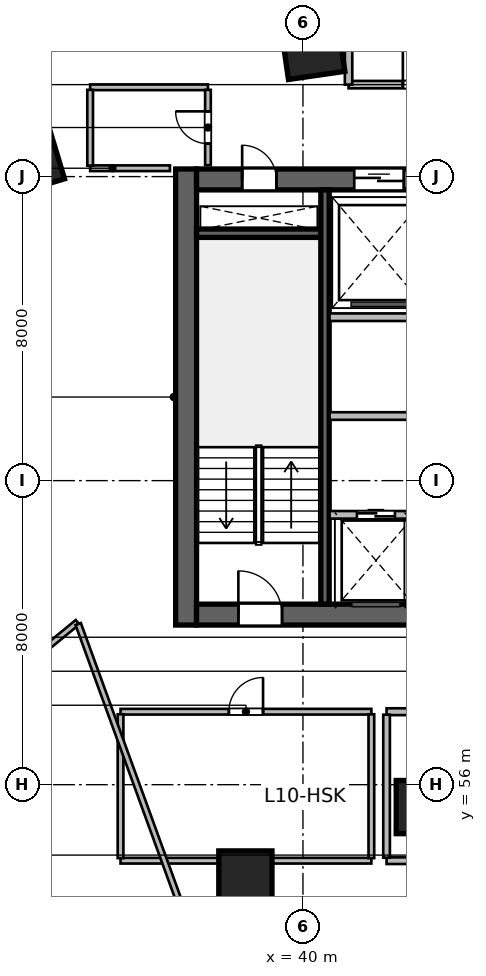
"""IFC4 building model, lengths in metres.
Left out: names, types, materials, properties, quantities, classifications, styles, units other than length and angle.
Written with IfcOpenShell. Run it as: python <this file> out.ifc"""

import sys

from ifc_helpers import new_model, si_unit, direction, frame, frame_2d, origin, origin_2d, place, context, subcontext, project, spatial, rectangle, circle, extrude, source, transform, mapped, element, fill, save


model = new_model("IFC4")
c1 = context("Model", 3, precision=1e-05, world=origin(), true_north=direction((0.0, 1.0)))
c2 = subcontext(c1, "Body", "Model", "MODEL_VIEW")
j1 = project(units=[si_unit("LENGTHUNIT", "METRE"), si_unit("PLANEANGLEUNIT", "RADIAN")], contexts=[c1])
p1 = place(None, origin())
s1 = spatial("IfcSite", under=j1, at=p1, CompositionType="ELEMENT")
p2 = place(p1, origin())
s2 = spatial("IfcBuilding", under=s1, at=p2, CompositionType="ELEMENT")
p3 = place(p2, frame((0.0, 0.0, 49.8)))
s3 = spatial("IfcBuildingStorey", under=s2, at=p3, CompositionType="ELEMENT", Elevation=49.8)
m1 = source(origin(), c2, "Body", "SweptSolid", [
    extrude(rectangle(XDim=12.0, YDim=0.55, at=frame_2d((6.0, 0.0))), origin(), (0.0, 0.0, 1.0), 3.6),
])
p4 = place(p3, frame((36.925, 60.2, 0.0), z_axis=(0.0, 0.0, 1.0), x_axis=(0.0, 1.0, 0.0)))
e1 = element("IfcWall", 1, at=p4, inside=s3, PredefinedType="SHEAR", context=c2, shape_type="MappedRepresentation", body=[
    mapped(m1, transform((0.0, 0.0, 0.0), scale=1.0)),
])
m2 = source(origin(), c2, "Body", "SweptSolid", [
    extrude(rectangle(XDim=21.6, YDim=0.55, at=frame_2d((10.8, 0.0))), origin(), (0.0, 0.0, 1.0), 3.6),
])
p5 = place(p3, frame((37.2, 60.475, 0.0), z_axis=(0.0, 0.0, 1.0), x_axis=(1.0, 0.0, 0.0)))
e2 = element("IfcWall", 2, at=p5, inside=s3, PredefinedType="SHEAR", context=c2, shape_type="MappedRepresentation", body=[
    mapped(m2, transform((0.0, 0.0, 0.0), scale=1.0)),
])
p6 = place(p5, frame((1.1, 0.0, 0.0)))
e3 = element("IfcOpeningElement", 3, at=p6, cuts=e2, PredefinedType="OPENING", context=c2, shape_type="SweptSolid", body=[
    extrude(rectangle(XDim=1.15, YDim=2.15, at=frame_2d((0.575, 1.075))), frame((0.0, 0.285, 0.0), z_axis=(0.0, -1.0, 0.0), x_axis=(1.0, 0.0, 0.0)), (0.0, 0.0, 1.0), 0.57),
])
p7 = place(p5, frame((19.5, 0.0, 0.0)))
e4 = element("IfcOpeningElement", 4, at=p7, cuts=e2, PredefinedType="OPENING", context=c2, shape_type="SweptSolid", body=[
    extrude(rectangle(XDim=0.9, YDim=2.1, at=frame_2d((0.45, 1.05))), frame((0.0, 0.285, 0.0), z_axis=(0.0, -1.0, 0.0), x_axis=(1.0, 0.0, 0.0)), (0.0, 0.0, 1.0), 0.57),
])
p8 = place(p5, frame((12.02, 0.0, 0.0)))
e5 = element("IfcOpeningElement", 5, at=p8, cuts=e2, PredefinedType="OPENING", context=c2, shape_type="SweptSolid", body=[
    extrude(rectangle(XDim=1.6, YDim=2.15, at=frame_2d((0.8, 1.075))), frame((0.0, 0.285, 0.0), z_axis=(0.0, -1.0, 0.0), x_axis=(1.0, 0.0, 0.0)), (0.0, 0.0, 1.0), 0.57),
])
p9 = place(p3, frame((37.2, 71.925, 0.0), z_axis=(0.0, 0.0, 1.0), x_axis=(1.0, 0.0, 0.0)))
e6 = element("IfcWall", 6, at=p9, inside=s3, PredefinedType="SHEAR", context=c2, shape_type="MappedRepresentation", body=[
    mapped(m2, transform((0.0, 0.0, 0.0), scale=1.0)),
])
p10 = place(p9, frame((1.2, 0.0, 0.0)))
e7 = element("IfcOpeningElement", 7, at=p10, cuts=e6, PredefinedType="OPENING", context=c2, shape_type="SweptSolid", body=[
    extrude(rectangle(XDim=0.9, YDim=2.1, at=frame_2d((0.45, 1.05))), frame((0.0, 0.285, 0.0), z_axis=(0.0, -1.0, 0.0), x_axis=(1.0, 0.0, 0.0)), (0.0, 0.0, 1.0), 0.57),
])
p11 = place(p9, frame((14.7, 0.0, 0.0)))
e8 = element("IfcOpeningElement", 8, at=p11, cuts=e6, PredefinedType="OPENING", context=c2, shape_type="SweptSolid", body=[
    extrude(rectangle(XDim=1.2, YDim=2.15, at=frame_2d((0.6, 1.075))), frame((0.0, 0.285, 0.0), z_axis=(0.0, -1.0, 0.0), x_axis=(1.0, 0.0, 0.0)), (0.0, 0.0, 1.0), 0.57),
])
p12 = place(p9, frame((4.15, 0.0, 0.0)))
e9 = element("IfcOpeningElement", 9, at=p12, cuts=e6, PredefinedType="OPENING", context=c2, shape_type="SweptSolid", body=[
    extrude(rectangle(XDim=1.3, YDim=2.15, at=frame_2d((0.65, 1.075))), frame((0.0, 0.285, 0.0), z_axis=(0.0, -1.0, 0.0), x_axis=(1.0, 0.0, 0.0)), (0.0, 0.0, 1.0), 0.57),
])
p13 = place(p9, frame((6.76, 0.0, 0.0)))
e10 = element("IfcOpeningElement", 10, at=p13, cuts=e6, PredefinedType="OPENING", context=c2, shape_type="SweptSolid", body=[
    extrude(rectangle(XDim=0.85, YDim=2.1, at=frame_2d((0.425, 1.05))), frame((0.0, 0.285, 0.0), z_axis=(0.0, -1.0, 0.0), x_axis=(1.0, 0.0, 0.0)), (0.0, 0.0, 1.0), 0.57),
])
p14 = place(p9, frame((8.76, 0.0, 0.0)))
e11 = element("IfcOpeningElement", 11, at=p14, cuts=e6, PredefinedType="OPENING", context=c2, shape_type="SweptSolid", body=[
    extrude(rectangle(XDim=0.85, YDim=2.1, at=frame_2d((0.425, 1.05))), frame((0.0, 0.285, 0.0), z_axis=(0.0, -1.0, 0.0), x_axis=(1.0, 0.0, 0.0)), (0.0, 0.0, 1.0), 0.57),
])
p15 = place(p9, frame((10.725, 0.0, 0.0)))
e12 = element("IfcOpeningElement", 12, at=p15, cuts=e6, PredefinedType="OPENING", context=c2, shape_type="SweptSolid", body=[
    extrude(rectangle(XDim=0.85, YDim=2.1, at=frame_2d((0.425, 1.05))), frame((0.0, 0.285, 0.0), z_axis=(0.0, -1.0, 0.0), x_axis=(1.0, 0.0, 0.0)), (0.0, 0.0, 1.0), 0.57),
])
m3 = source(origin(), c2, "Body", "SweptSolid", [
    extrude(rectangle(XDim=3.27, YDim=0.22, at=frame_2d((1.635, 0.0))), origin(), (0.0, 0.0, 1.0), 3.6),
])
p16 = place(p3, frame((37.2, 70.51, 0.0), z_axis=(0.0, 0.0, 1.0), x_axis=(1.0, 0.0, 0.0)))
e13 = element("IfcWall", 13, at=p16, inside=s3, PredefinedType="SHEAR", context=c2, shape_type="MappedRepresentation", body=[
    mapped(m3, transform((0.0, 0.0, 0.0), scale=1.0)),
])
m4 = source(origin(), c2, "Body", "SweptSolid", [
    extrude(rectangle(XDim=10.9, YDim=0.22, at=frame_2d((5.45, 0.0))), origin(), (0.0, 0.0, 1.0), 3.6),
])
p17 = place(p3, frame((40.58, 60.75, 0.0), z_axis=(0.0, 0.0, 1.0), x_axis=(0.0, 1.0, 0.0)))
e14 = element("IfcWall", 14, at=p17, inside=s3, PredefinedType="SHEAR", context=c2, shape_type="MappedRepresentation", body=[
    mapped(m4, transform((0.0, 0.0, 0.0), scale=1.0)),
])
m5 = source(origin(), c2, "Body", "SweptSolid", [
    extrude(circle(Radius=0.7, at=origin_2d()), origin(), (0.0, 0.0, 1.0), 3.6),
])
p18 = place(p3, frame((38.485, 53.558, 0.0), z_axis=(0.0, 0.0, 1.0), x_axis=(-0.288697611798, 0.957420330337, 0.0)))
e15 = element("IfcColumn", 15, at=p18, inside=s3, PredefinedType="COLUMN", context=c2, shape_type="MappedRepresentation", body=[
    mapped(m5, transform((0.0, 0.0, 0.0), scale=1.0)),
])
m6 = source(origin(), c2, "Body", "SweptSolid", [
    extrude(rectangle(XDim=1.5, YDim=1.5, at=origin_2d()), origin(), (0.0, 0.0, 1.0), 3.6),
])
p19 = place(p3, frame((32.791, 72.442, 0.0), z_axis=(0.0, 0.0, 1.0), x_axis=(-0.288697611798, 0.957420330337, 0.0)))
e16 = element("IfcColumn", 16, at=p19, inside=s3, PredefinedType="COLUMN", context=c2, shape_type="MappedRepresentation", body=[
    mapped(m6, transform((0.0, 0.0, 0.0), scale=1.0)),
])
p20 = place(p3, frame((43.154, 55.411, 0.0), z_axis=(0.0, 0.0, 1.0), x_axis=(-0.143492621991, 0.98965138682, 0.0)))
e17 = element("IfcColumn", 17, at=p20, inside=s3, PredefinedType="COLUMN", context=c2, shape_type="MappedRepresentation", body=[
    mapped(m5, transform((0.0, 0.0, 0.0), scale=1.0)),
])
p21 = place(p3, frame((40.253, 75.404, 0.0), z_axis=(0.0, 0.0, 1.0), x_axis=(-0.143492621991, 0.98965138682, 0.0)))
e18 = element("IfcColumn", 18, at=p21, inside=s3, PredefinedType="COLUMN", context=c2, shape_type="MappedRepresentation", body=[
    mapped(m6, transform((0.0, 0.0, 0.0), scale=1.0)),
])
m7 = source(origin(), c2, "Body", "SweptSolid", [
    extrude(rectangle(XDim=8.8, YDim=0.2, at=frame_2d((4.4, 0.0))), origin(), (0.0, 0.0, 1.0), 3.36),
])
p22 = place(p3, frame((40.7, 68.3, 0.0), z_axis=(0.0, 0.0, 1.0), x_axis=(1.0, 0.0, 0.0)))
e19 = element("IfcWall", 19, at=p22, inside=s3, PredefinedType="SOLIDWALL", context=c2, shape_type="MappedRepresentation", body=[
    mapped(m7, transform((0.0, 0.0, 0.0), scale=1.0)),
])
m8 = source(origin(), c2, "Body", "SweptSolid", [
    extrude(rectangle(XDim=8.02, YDim=0.2, at=frame_2d((4.01, 0.0))), origin(), (0.0, 0.0, 1.0), 3.36),
])
p23 = place(p3, frame((40.7, 63.1, 0.0), z_axis=(0.0, 0.0, 1.0), x_axis=(1.0, 0.0, 0.0)))
e20 = element("IfcWall", 20, at=p23, inside=s3, PredefinedType="SOLIDWALL", context=c2, shape_type="MappedRepresentation", body=[
    mapped(m8, transform((0.0, 0.0, 0.0), scale=1.0)),
])
p24 = place(p23, frame((0.72, 0.0, 0.0)))
e21 = element("IfcOpeningElement", 21, at=p24, cuts=e20, PredefinedType="OPENING", context=c2, shape_type="SweptSolid", body=[
    extrude(rectangle(XDim=1.0, YDim=2.15, at=frame_2d((0.5, 1.075))), frame((0.0, 0.11, 0.0), z_axis=(0.0, -1.0, 0.0), x_axis=(1.0, 0.0, 0.0)), (0.0, 0.0, 1.0), 0.22),
])
p25 = place(p23, frame((2.62, 0.0, 0.0)))
e22 = element("IfcOpeningElement", 22, at=p25, cuts=e20, PredefinedType="OPENING", context=c2, shape_type="SweptSolid", body=[
    extrude(rectangle(XDim=1.0, YDim=2.15, at=frame_2d((0.5, 1.075))), frame((0.0, 0.11, 0.0), z_axis=(0.0, -1.0, 0.0), x_axis=(1.0, 0.0, 0.0)), (0.0, 0.0, 1.0), 0.22),
])
p26 = place(p23, frame((4.55, 0.0, 0.0)))
e23 = element("IfcOpeningElement", 23, at=p26, cuts=e20, PredefinedType="OPENING", context=c2, shape_type="SweptSolid", body=[
    extrude(rectangle(XDim=1.0, YDim=2.15, at=frame_2d((0.5, 1.075))), frame((0.0, 0.11, 0.0), z_axis=(0.0, -1.0, 0.0), x_axis=(1.0, 0.0, 0.0)), (0.0, 0.0, 1.0), 0.22),
])
p27 = place(p23, frame((6.55, 0.0, 0.0)))
e24 = element("IfcOpeningElement", 24, at=p27, cuts=e20, PredefinedType="OPENING", context=c2, shape_type="SweptSolid", body=[
    extrude(rectangle(XDim=1.0, YDim=2.15, at=frame_2d((0.5, 1.075))), frame((0.0, 0.11, 0.0), z_axis=(0.0, -1.0, 0.0), x_axis=(1.0, 0.0, 0.0)), (0.0, 0.0, 1.0), 0.22),
])
p28 = place(p3, frame((40.7, 65.7, 0.0), z_axis=(0.0, 0.0, 1.0), x_axis=(1.0, 0.0, 0.0)))
e25 = element("IfcWall", 25, at=p28, inside=s3, PredefinedType="SOLIDWALL", context=c2, shape_type="MappedRepresentation", body=[
    mapped(m7, transform((0.0, 0.0, 0.0), scale=1.0)),
])
p29 = place(p28, frame((3.8, 0.0, 0.0)))
e26 = element("IfcOpeningElement", 26, at=p29, cuts=e25, PredefinedType="OPENING", context=c2, shape_type="SweptSolid", body=[
    extrude(rectangle(XDim=0.95, YDim=2.15, at=frame_2d((0.475, 1.075))), frame((0.0, 0.11, 0.0), z_axis=(0.0, -1.0, 0.0), x_axis=(1.0, 0.0, 0.0)), (0.0, 0.0, 1.0), 0.22),
])
m9 = source(origin(), c2, "Body", "SweptSolid", [
    extrude(rectangle(XDim=2.1, YDim=0.15, at=frame_2d((1.05, 0.0))), origin(), (0.0, 0.0, 1.0), 3.36),
])
p30 = place(p3, frame((34.4, 72.22, 0.0), z_axis=(0.0, 0.0, 1.0), x_axis=(1.0, 0.0, 0.0)))
e27 = element("IfcWall", 27, at=p30, inside=s3, PredefinedType="PARTITIONING", context=c2, shape_type="MappedRepresentation", body=[
    mapped(m9, transform((0.0, 0.0, 0.0), scale=1.0)),
])
m10 = source(origin(), c2, "Body", "SweptSolid", [
    extrude(rectangle(XDim=3.1, YDim=0.15, at=frame_2d((1.55, 0.0))), origin(), (0.0, 0.0, 1.0), 2.729),
])
p31 = place(p3, frame((34.4, 74.35, 0.0), z_axis=(0.0, 0.0, 1.0), x_axis=(1.0, 0.0, 0.0)))
e28 = element("IfcWall", 28, at=p31, inside=s3, PredefinedType="PARTITIONING", context=c2, shape_type="MappedRepresentation", body=[
    mapped(m10, transform((0.0, 0.0, 0.0), scale=1.0)),
])
m11 = source(origin(), c2, "Body", "SweptSolid", [
    extrude(rectangle(XDim=1.995, YDim=0.15, at=frame_2d((0.998, 0.0))), origin(), (0.0, 0.0, 1.0), 3.36),
])
p32 = place(p3, frame((34.4, 72.288, 0.0), z_axis=(0.0, 0.0, 1.0), x_axis=(0.0, 1.0, 0.0)))
e29 = element("IfcWall", 29, at=p32, inside=s3, PredefinedType="PARTITIONING", context=c2, shape_type="MappedRepresentation", body=[
    mapped(m11, transform((0.0, 0.0, 0.0), scale=1.0)),
])
m12 = source(origin(), c2, "Body", "SweptSolid", [
    extrude(rectangle(XDim=1.982, YDim=0.15, at=frame_2d((0.991, 0.0))), origin(), (0.0, 0.0, 1.0), 3.36),
])
p33 = place(p3, frame((37.5, 72.3, 0.0), z_axis=(0.0, 0.0, 1.0), x_axis=(0.0, 1.0, 0.0)))
e30 = element("IfcWall", 30, at=p33, inside=s3, PredefinedType="PARTITIONING", context=c2, shape_type="MappedRepresentation", body=[
    mapped(m12, transform((0.0, 0.0, 0.0), scale=1.0)),
])
p34 = place(p33, frame((0.566, 0.0, 0.0)))
e31 = element("IfcOpeningElement", 31, at=p34, cuts=e30, PredefinedType="OPENING", context=c2, shape_type="SweptSolid", body=[
    extrude(rectangle(XDim=0.85, YDim=2.1, at=frame_2d((0.425, 1.05))), frame((0.0, 0.085, 0.0), z_axis=(0.0, -1.0, 0.0), x_axis=(1.0, 0.0, 0.0)), (0.0, 0.0, 1.0), 0.17),
])
m13 = source(origin(), c2, "Body", "SweptSolid", [
    extrude(rectangle(XDim=6.6, YDim=0.15, at=frame_2d((3.3, 0.0))), origin(), (0.0, 0.0, 1.0), 2.803),
])
p35 = place(p3, frame((35.2, 54.0, 0.0), z_axis=(0.0, 0.0, 1.0), x_axis=(1.0, 0.0, 0.0)))
e32 = element("IfcWall", 32, at=p35, inside=s3, PredefinedType="PARTITIONING", context=c2, shape_type="MappedRepresentation", body=[
    mapped(m13, transform((0.0, 0.0, 0.0), scale=1.0)),
])
m14 = source(origin(), c2, "Body", "SweptSolid", [
    extrude(rectangle(XDim=6.6, YDim=0.15, at=frame_2d((3.3, 0.0))), origin(), (0.0, 0.0, 1.0), 3.36),
])
p36 = place(p3, frame((35.2, 57.92, 0.0), z_axis=(0.0, 0.0, 1.0), x_axis=(1.0, 0.0, 0.0)))
e33 = element("IfcWall", 33, at=p36, inside=s3, PredefinedType="PARTITIONING", context=c2, shape_type="MappedRepresentation", body=[
    mapped(m14, transform((0.0, 0.0, 0.0), scale=1.0)),
])
p37 = place(p36, frame((2.85, 0.0, 0.0)))
e34 = element("IfcOpeningElement", 34, at=p37, cuts=e33, PredefinedType="OPENING", context=c2, shape_type="SweptSolid", body=[
    extrude(rectangle(XDim=0.9, YDim=2.1, at=frame_2d((0.45, 1.05))), frame((0.0, 0.085, 0.0), z_axis=(0.0, -1.0, 0.0), x_axis=(1.0, 0.0, 0.0)), (0.0, 0.0, 1.0), 0.17),
])
m15 = source(origin(), c2, "Body", "SweptSolid", [
    extrude(rectangle(XDim=3.785, YDim=0.15, at=frame_2d((1.893, 0.0))), origin(), (0.0, 0.0, 1.0), 3.36),
])
for number, where, z_axis, x_axis in (
    (35, (35.2, 54.067, 0.0), (0.0, 0.0, 1.0), (0.0, 1.0, 0.0)),
    (36, (41.8, 54.067, 0.0), (0.0, 0.0, 1.0), (0.0, 1.0, 0.0)),
):
    element("IfcWall", number, at=place(p3, frame(where, z_axis=z_axis, x_axis=x_axis)), inside=s3, PredefinedType="PARTITIONING", context=c2, shape_type="MappedRepresentation", body=[
        mapped(m15, transform((0.0, 0.0, 0.0), scale=1.0)),
    ])
m16 = source(origin(), c2, "Body", "SweptSolid", [
    extrude(rectangle(XDim=4.176, YDim=0.175, at=frame_2d((2.088, 0.0))), origin(), (0.0, 0.0, 1.0), 3.36),
])
p38 = place(p3, frame((42.2, 54.0, 0.0), z_axis=(0.0, 0.0, 1.0), x_axis=(1.0, 0.0, 0.0)))
e37 = element("IfcWall", 37, at=p38, inside=s3, PredefinedType="PARTITIONING", context=c2, shape_type="MappedRepresentation", body=[
    mapped(m16, transform((0.0, 0.0, 0.0), scale=1.0)),
])
m17 = source(origin(), c2, "Body", "SweptSolid", [
    extrude(rectangle(XDim=4.176, YDim=0.18, at=frame_2d((2.088, 0.0))), origin(), (0.0, 0.0, 1.0), 3.36),
])
p39 = place(p3, frame((42.2, 57.92, 0.0), z_axis=(0.0, 0.0, 1.0), x_axis=(1.0, 0.0, 0.0)))
e38 = element("IfcWall", 38, at=p39, inside=s3, PredefinedType="PLUMBINGWALL", context=c2, shape_type="MappedRepresentation", body=[
    mapped(m17, transform((0.0, 0.0, 0.0), scale=1.0)),
])
p40 = place(p39, frame((1.638, 0.0, 0.0)))
e39 = element("IfcOpeningElement", 39, at=p40, cuts=e38, PredefinedType="OPENING", context=c2, shape_type="SweptSolid", body=[
    extrude(rectangle(XDim=0.9, YDim=2.08, at=frame_2d((0.45, 1.04))), frame((0.0, 0.1, 0.0), z_axis=(0.0, -1.0, 0.0), x_axis=(1.0, 0.0, 0.0)), (0.0, 0.0, 1.0), 0.2),
])
m18 = source(origin(), c2, "Body", "SweptSolid", [
    extrude(rectangle(XDim=3.763, YDim=0.175, at=frame_2d((1.881, 0.0))), origin(), (0.0, 0.0, 1.0), 3.36),
])
p41 = place(p3, frame((42.2, 54.079, 0.0), z_axis=(0.0, 0.0, 1.0), x_axis=(0.0, 1.0, 0.0)))
e40 = element("IfcWall", 40, at=p41, inside=s3, PredefinedType="PARTITIONING", context=c2, shape_type="MappedRepresentation", body=[
    mapped(m18, transform((0.0, 0.0, 0.0), scale=1.0)),
])
m19 = source(origin(), c2, "Body", "SweptSolid", [
    extrude(rectangle(XDim=6.8, YDim=0.195, at=frame_2d((3.4, 0.0))), origin(), (0.0, 0.0, 1.0), 3.36),
])
p42 = place(p3, frame((41.2, 74.42, 0.0), z_axis=(0.0, 0.0, 1.0), x_axis=(1.0, 0.0, 0.0)))
e41 = element("IfcWall", 41, at=p42, inside=s3, PredefinedType="PARTITIONING", context=c2, shape_type="MappedRepresentation", body=[
    mapped(m19, transform((0.0, 0.0, 0.0), scale=1.0)),
])
p43 = place(p42, frame((1.429, 0.0, 0.0)))
e42 = element("IfcOpeningElement", 42, at=p43, cuts=e41, PredefinedType="OPENING", context=c2, shape_type="SweptSolid", body=[
    extrude(rectangle(XDim=0.95, YDim=2.15, at=frame_2d((0.475, 1.075))), frame((0.0, 0.107, 0.0), z_axis=(0.0, -1.0, 0.0), x_axis=(1.0, 0.0, 0.0)), (0.0, 0.0, 1.0), 0.215),
])
m20 = source(origin(), c2, "Body", "SweptSolid", [
    extrude(rectangle(XDim=5.426, YDim=0.195, at=frame_2d((2.713, 0.0))), origin(), (0.0, 0.0, 1.0), 3.36),
])
p44 = place(p3, frame((41.2, 74.42, 0.0), z_axis=(0.0, 0.0, 1.0), x_axis=(0.0, 1.0, 0.0)))
e43 = element("IfcWall", 43, at=p44, inside=s3, PredefinedType="PARTITIONING", context=c2, shape_type="MappedRepresentation", body=[
    mapped(m20, transform((0.0, 0.0, 0.0), scale=1.0)),
])
m21 = source(origin(), c2, "Body", "SweptSolid", [
    extrude(rectangle(XDim=6.721, YDim=0.15, at=frame_2d((3.361, 0.0))), origin(), (0.0, 0.0, 1.0), 3.36),
])
p45 = place(p3, frame((28.874, 56.01, 0.0), z_axis=(0.0, 0.0, 1.0), x_axis=(0.772828051199, 0.63461547671, 0.0)))
e44 = element("IfcWall", 44, at=p45, inside=s3, PredefinedType="PARTITIONING", context=c2, shape_type="MappedRepresentation", body=[
    mapped(m21, transform((0.0, 0.0, 0.0), scale=1.0)),
])
m22 = source(origin(), c2, "Body", "SweptSolid", [
    extrude(rectangle(XDim=12.196, YDim=0.15, at=frame_2d((6.098, 0.0))), origin(), (0.0, 0.0, 1.0), 3.36),
])
p46 = place(p3, frame((38.258, 48.766, 0.0), z_axis=(0.0, 0.0, 1.0), x_axis=(-0.342022711534, 0.939691686031, 0.0)))
e45 = element("IfcWall", 45, at=p46, inside=s3, PredefinedType="PARTITIONING", context=c2, shape_type="MappedRepresentation", body=[
    mapped(m22, transform((0.0, 0.0, 0.0), scale=1.0)),
])
m23 = source(origin(), c2, "Body", "SweptSolid", [
    extrude(rectangle(XDim=1.15, YDim=2.15, at=frame_2d((0.575, 1.075))), frame((0.0, 0.025, 0.0), z_axis=(0.0, -1.0, 0.0), x_axis=(1.0, 0.0, 0.0)), (0.0, 0.0, 1.0), 0.05),
])
p47 = place(p6, origin())
e46 = element("IfcDoor", 46, at=p47, inside=s3, OperationType="SINGLE_SWING_LEFT", PredefinedType="DOOR", context=c2, shape_type="MappedRepresentation", body=[
    mapped(m23, transform((0.0, 0.0, 0.0), scale=1.0)),
])
fill(e3, e46)
m24 = source(origin(), c2, "Body", "SweptSolid", [
    extrude(rectangle(XDim=0.9, YDim=2.1, at=frame_2d((0.45, 1.05))), frame((0.0, 0.025, 0.0), z_axis=(0.0, -1.0, 0.0), x_axis=(1.0, 0.0, 0.0)), (0.0, 0.0, 1.0), 0.05),
])
p48 = place(p10, origin())
e47 = element("IfcDoor", 47, at=p48, inside=s3, OperationType="SINGLE_SWING_LEFT", PredefinedType="DOOR", context=c2, shape_type="MappedRepresentation", body=[
    mapped(m24, transform((0.0, 0.0, 0.0), scale=1.0)),
])
fill(e7, e47)
m25 = source(origin(), c2, "Body", "SweptSolid", [
    extrude(rectangle(XDim=1.3, YDim=2.15, at=frame_2d((0.65, 1.075))), frame((0.0, 0.025, 0.0), z_axis=(0.0, -1.0, 0.0), x_axis=(1.0, 0.0, 0.0)), (0.0, 0.0, 1.0), 0.05),
])
p49 = place(p12, origin())
e48 = element("IfcDoor", 48, at=p49, inside=s3, OperationType="DOUBLE_DOOR_SLIDING", PredefinedType="DOOR", context=c2, shape_type="MappedRepresentation", body=[
    mapped(m25, transform((0.0, 0.0, 0.0), scale=1.0)),
])
fill(e9, e48)
m26 = source(origin(), c2, "Body", "SweptSolid", [
    extrude(rectangle(XDim=1.0, YDim=2.15, at=frame_2d((0.5, 1.075))), frame((0.0, 0.025, 0.0), z_axis=(0.0, -1.0, 0.0), x_axis=(1.0, 0.0, 0.0)), (0.0, 0.0, 1.0), 0.05),
])
p50 = place(p24, origin())
e49 = element("IfcDoor", 49, at=p50, inside=s3, OperationType="DOUBLE_DOOR_SLIDING", PredefinedType="DOOR", context=c2, shape_type="MappedRepresentation", body=[
    mapped(m26, transform((0.0, 0.0, 0.0), scale=1.0)),
])
fill(e21, e49)
m27 = source(origin(), c2, "Body", "SweptSolid", [
    extrude(rectangle(XDim=0.85, YDim=2.1, at=frame_2d((0.425, 1.05))), frame((0.0, 0.025, 0.0), z_axis=(0.0, -1.0, 0.0), x_axis=(1.0, 0.0, 0.0)), (0.0, 0.0, 1.0), 0.05),
])
p51 = place(p34, origin())
e50 = element("IfcDoor", 50, at=p51, inside=s3, OperationType="SINGLE_SWING_RIGHT", PredefinedType="DOOR", context=c2, shape_type="MappedRepresentation", body=[
    mapped(m27, transform((0.0, 0.0, 0.0), scale=1.0)),
])
fill(e31, e50)
p52 = place(p37, origin())
e51 = element("IfcDoor", 51, at=p52, inside=s3, OperationType="SINGLE_SWING_RIGHT", PredefinedType="DOOR", context=c2, shape_type="MappedRepresentation", body=[
    mapped(m24, transform((0.0, 0.0, 0.0), scale=1.0)),
])
fill(e34, e51)
m28 = source(origin(), c2, "Body", "SweptSolid", [
    extrude(rectangle(XDim=0.95, YDim=2.15, at=frame_2d((0.475, 1.075))), frame((0.0, 0.025, 0.0), z_axis=(0.0, -1.0, 0.0), x_axis=(1.0, 0.0, 0.0)), (0.0, 0.0, 1.0), 0.05),
])
p53 = place(p43, origin())
e52 = element("IfcDoor", 52, at=p53, inside=s3, OperationType="SINGLE_SWING_LEFT", PredefinedType="DOOR", context=c2, shape_type="MappedRepresentation", body=[
    mapped(m28, transform((0.0, 0.0, 0.0), scale=1.0)),
])
fill(e42, e52)
save(model, sys.argv[1])
